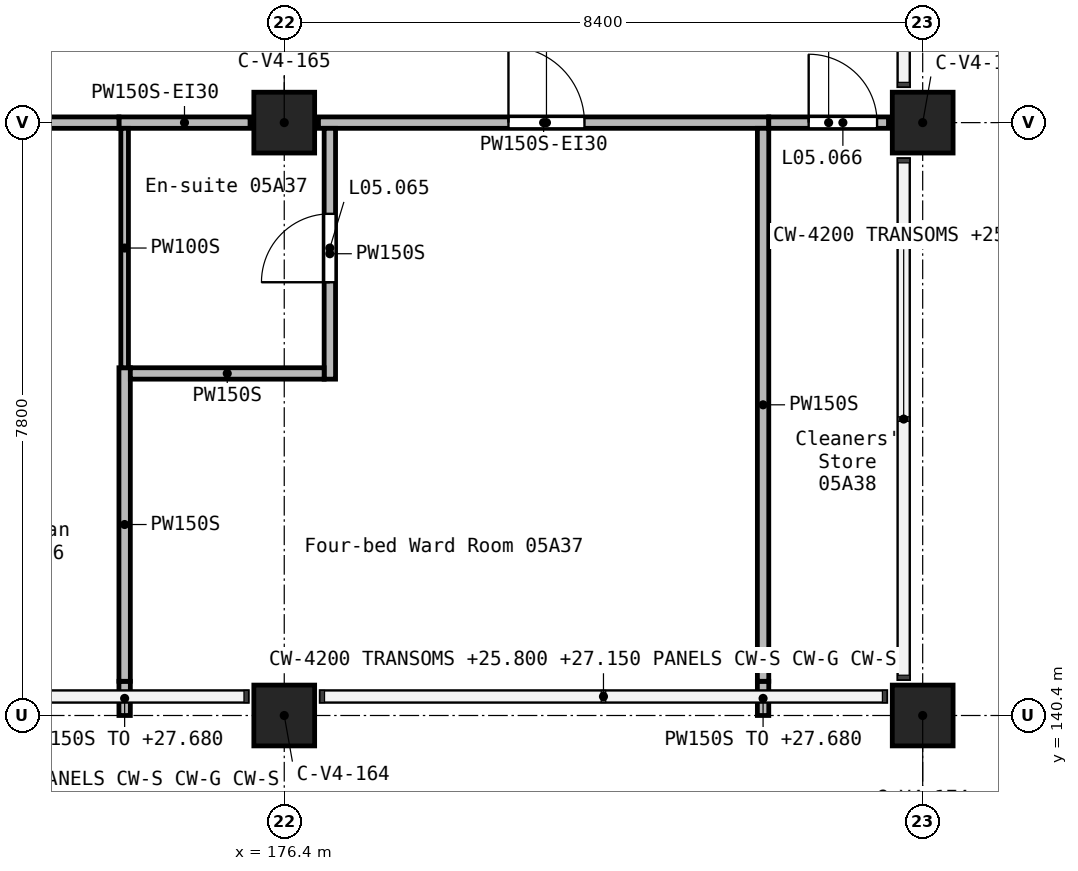
"""IFC4 building model, lengths in metres.
Left out: names, types, materials, properties, quantities, classifications, styles, units other than length and angle.
Written with IfcOpenShell. Run it as: python <this file> out.ifc"""

import sys

from ifc_helpers import new_model, si_unit, direction, frame, frame_2d, origin, origin_2d, place, context, subcontext, project, spatial, rectangle, extrude, element, fill, save


model = new_model("IFC4")
c1 = context("Model", 3, precision=1e-05, world=origin(), true_north=direction((0.0, 1.0)))
c2 = subcontext(c1, "Body", "Model", "MODEL_VIEW")
j1 = project(units=[si_unit("LENGTHUNIT", "METRE"), si_unit("PLANEANGLEUNIT", "RADIAN")], contexts=[c1])
p1 = place(None, origin())
s1 = spatial("IfcSite", under=j1, at=p1, CompositionType="ELEMENT")
p2 = place(p1, origin())
s2 = spatial("IfcBuilding", under=s1, at=p2, CompositionType="ELEMENT")
p3 = place(p2, frame((0.0, 0.0, 24.9)))
s3 = spatial("IfcBuildingStorey", under=s2, at=p3, CompositionType="ELEMENT", Elevation=24.9)
for number, where, z_axis, x_axis in (
    (1, (176.4, 140.4, 0.0), (0.0, 0.0, 1.0), (1.0, 0.0, 0.0)),
    (2, (176.4, 148.2, 0.0), (0.0, 0.0, 1.0), (1.0, 0.0, 0.0)),
    (3, (184.8, 140.4, 0.0), (0.0, 0.0, 1.0), (1.0, 0.0, 0.0)),
    (4, (184.8, 148.2, 0.0), (0.0, 0.0, 1.0), (1.0, 0.0, 0.0)),
):
    element("IfcColumn", number, at=place(p3, frame(where, z_axis=z_axis, x_axis=x_axis)), inside=s3, PredefinedType="COLUMN", context=c2, shape_type="SweptSolid", body=[
        extrude(rectangle(XDim=0.8, YDim=0.8, at=origin_2d()), origin(), (0.0, 0.0, 1.0), 3.9),
    ])
p4 = place(p3, frame((174.225, 148.2, 0.0), z_axis=(0.0, 0.0, 1.0), x_axis=(1.0, 0.0, 0.0)))
e5 = element("IfcWall", 5, at=p4, inside=s3, PredefinedType="PARTITIONING", context=c2, shape_type="SweptSolid", body=[
    extrude(rectangle(XDim=1.725, YDim=0.15, at=frame_2d((0.862, 0.0))), origin(), (0.0, 0.0, 1.0), 3.6),
])
p5 = place(p3, frame((176.85, 148.2, 0.0), z_axis=(0.0, 0.0, 1.0), x_axis=(1.0, 0.0, 0.0)))
e6 = element("IfcWall", 6, at=p5, inside=s3, PredefinedType="PARTITIONING", context=c2, shape_type="SweptSolid", body=[
    extrude(rectangle(XDim=5.925, YDim=0.15, at=frame_2d((2.962, 0.0))), origin(), (0.0, 0.0, 1.0), 3.6),
])
p6 = place(p5, frame((2.5, 0.0, 0.0)))
e7 = element("IfcOpeningElement", 7, at=p6, cuts=e6, PredefinedType="OPENING", context=c2, shape_type="SweptSolid", body=[
    extrude(rectangle(XDim=1.0, YDim=2.1, at=frame_2d((0.5, 1.05))), frame((0.0, 0.085, 0.0), z_axis=(0.0, -1.0, 0.0), x_axis=(1.0, 0.0, 0.0)), (0.0, 0.0, 1.0), 0.17),
])
p7 = place(p3, frame((170.175, 148.2, 0.0), z_axis=(0.0, 0.0, 1.0), x_axis=(1.0, 0.0, 0.0)))
e8 = element("IfcWall", 8, at=p7, inside=s3, PredefinedType="PARTITIONING", context=c2, shape_type="SweptSolid", body=[
    extrude(rectangle(XDim=4.05, YDim=0.15, at=frame_2d((2.025, 0.0))), origin(), (0.0, 0.0, 1.0), 3.6),
])
p8 = place(p7, frame((1.525, 0.0, 0.0)))
e9 = element("IfcOpeningElement", 9, at=p8, cuts=e8, PredefinedType="OPENING", context=c2, shape_type="SweptSolid", body=[
    extrude(rectangle(XDim=1.0, YDim=2.1, at=frame_2d((0.5, 1.05))), frame((0.0, 0.085, 0.0), z_axis=(0.0, -1.0, 0.0), x_axis=(1.0, 0.0, 0.0)), (0.0, 0.0, 1.0), 0.17),
])
p9 = place(p3, frame((182.775, 148.2, 0.0), z_axis=(0.0, 0.0, 1.0), x_axis=(1.0, 0.0, 0.0)))
e10 = element("IfcWall", 10, at=p9, inside=s3, PredefinedType="PARTITIONING", context=c2, shape_type="SweptSolid", body=[
    extrude(rectangle(XDim=1.575, YDim=0.15, at=frame_2d((0.788, 0.0))), origin(), (0.0, 0.0, 1.0), 3.6),
])
p10 = place(p9, frame((0.525, 0.0, 0.0)))
e11 = element("IfcOpeningElement", 11, at=p10, cuts=e10, PredefinedType="OPENING", context=c2, shape_type="SweptSolid", body=[
    extrude(rectangle(XDim=0.9, YDim=2.1, at=frame_2d((0.45, 1.05))), frame((0.0, 0.085, 0.0), z_axis=(0.0, -1.0, 0.0), x_axis=(1.0, 0.0, 0.0)), (0.0, 0.0, 1.0), 0.17),
])
p11 = place(p3, frame((182.7, 140.4, 0.0), z_axis=(0.0, 0.0, 1.0), x_axis=(0.0, 1.0, 0.0)))
e12 = element("IfcWall", 12, at=p11, inside=s3, PredefinedType="PARTITIONING", context=c2, shape_type="SweptSolid", body=[
    extrude(rectangle(XDim=0.45, YDim=0.15, at=frame_2d((0.225, 0.0))), origin(), (0.0, 0.0, 1.0), 2.78),
])
p12 = place(p3, frame((182.7, 140.85, 0.0), z_axis=(0.0, 0.0, 1.0), x_axis=(0.0, 1.0, 0.0)))
e13 = element("IfcWall", 13, at=p12, inside=s3, PredefinedType="PARTITIONING", context=c2, shape_type="SweptSolid", body=[
    extrude(rectangle(XDim=7.275, YDim=0.15, at=frame_2d((3.637, 0.0))), origin(), (0.0, 0.0, 1.0), 3.6),
])
p13 = place(p3, frame((174.3, 140.4, 0.0), z_axis=(0.0, 0.0, 1.0), x_axis=(0.0, 1.0, 0.0)))
e14 = element("IfcWall", 14, at=p13, inside=s3, PredefinedType="PARTITIONING", context=c2, shape_type="SweptSolid", body=[
    extrude(rectangle(XDim=0.45, YDim=0.15, at=frame_2d((0.225, 0.0))), origin(), (0.0, 0.0, 1.0), 2.78),
])
p14 = place(p3, frame((174.3, 140.85, 0.0), z_axis=(0.0, 0.0, 1.0), x_axis=(0.0, 1.0, 0.0)))
e15 = element("IfcWall", 15, at=p14, inside=s3, PredefinedType="PARTITIONING", context=c2, shape_type="SweptSolid", body=[
    extrude(rectangle(XDim=4.125, YDim=0.15, at=frame_2d((2.062, 0.0))), origin(), (0.0, 0.0, 1.0), 3.6),
])
p15 = place(p3, frame((177.0, 144.825, 0.0), z_axis=(0.0, 0.0, 1.0), x_axis=(0.0, 1.0, 0.0)))
e16 = element("IfcWall", 16, at=p15, inside=s3, PredefinedType="PARTITIONING", context=c2, shape_type="SweptSolid", body=[
    extrude(rectangle(XDim=3.3, YDim=0.15, at=frame_2d((1.65, 0.0))), origin(), (0.0, 0.0, 1.0), 3.6),
])
p16 = place(p15, frame((1.275, 0.0, 0.0)))
e17 = element("IfcOpeningElement", 17, at=p16, cuts=e16, PredefinedType="OPENING", context=c2, shape_type="SweptSolid", body=[
    extrude(rectangle(XDim=0.9, YDim=2.1, at=frame_2d((0.45, 1.05))), frame((0.0, 0.085, 0.0), z_axis=(0.0, -1.0, 0.0), x_axis=(1.0, 0.0, 0.0)), (0.0, 0.0, 1.0), 0.17),
])
p17 = place(p3, frame((174.375, 144.9, 0.0), z_axis=(0.0, 0.0, 1.0), x_axis=(1.0, 0.0, 0.0)))
e18 = element("IfcWall", 18, at=p17, inside=s3, PredefinedType="PARTITIONING", context=c2, shape_type="SweptSolid", body=[
    extrude(rectangle(XDim=2.55, YDim=0.15, at=frame_2d((1.275, 0.0))), origin(), (0.0, 0.0, 1.0), 3.6),
])
p18 = place(p3, frame((174.3, 144.975, 0.0), z_axis=(0.0, 0.0, 1.0), x_axis=(0.0, 1.0, 0.0)))
e19 = element("IfcWall", 19, at=p18, inside=s3, PredefinedType="PARTITIONING", context=c2, shape_type="SweptSolid", body=[
    extrude(rectangle(XDim=3.15, YDim=0.1, at=frame_2d((1.575, 0.0))), origin(), (0.0, 0.0, 1.0), 3.6),
])
p19 = place(p6, frame((1.0, 0.0, 0.0), z_axis=(0.0, 0.0, 1.0), x_axis=(-1.0, 0.0, 0.0)))
e20 = element("IfcDoor", 20, at=p19, inside=s3, OperationType="SINGLE_SWING_LEFT", PredefinedType="DOOR", context=c2, shape_type="SweptSolid", body=[
    extrude(rectangle(XDim=1.0, YDim=2.1, at=frame_2d((0.5, 1.05))), frame((0.0, 0.025, 0.0), z_axis=(0.0, -1.0, 0.0), x_axis=(1.0, 0.0, 0.0)), (0.0, 0.0, 1.0), 0.05),
])
fill(e7, e20)
p20 = place(p16, origin())
e21 = element("IfcDoor", 21, at=p20, inside=s3, OperationType="SINGLE_SWING_RIGHT", PredefinedType="DOOR", context=c2, shape_type="SweptSolid", body=[
    extrude(rectangle(XDim=0.9, YDim=2.1, at=frame_2d((0.45, 1.05))), frame((0.0, 0.025, 0.0), z_axis=(0.0, -1.0, 0.0), x_axis=(1.0, 0.0, 0.0)), (0.0, 0.0, 1.0), 0.05),
])
fill(e17, e21)
p21 = place(p10, frame((0.9, 0.0, 0.0), z_axis=(0.0, 0.0, 1.0), x_axis=(-1.0, 0.0, 0.0)))
e22 = element("IfcDoor", 22, at=p21, inside=s3, OperationType="SINGLE_SWING_LEFT", PredefinedType="DOOR", context=c2, shape_type="SweptSolid", body=[
    extrude(rectangle(XDim=0.9, YDim=2.1, at=frame_2d((0.45, 1.05))), frame((0.0, 0.025, 0.0), z_axis=(0.0, -1.0, 0.0), x_axis=(1.0, 0.0, 0.0)), (0.0, 0.0, 1.0), 0.05),
])
fill(e11, e22)
save(model, sys.argv[1])
